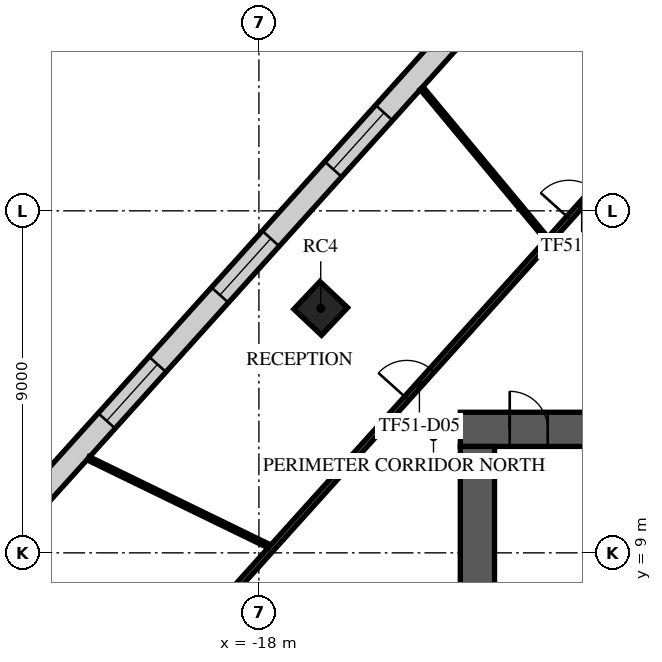
"""IFC4 building model, lengths in metres.
Left out: names, types, materials, properties, quantities, classifications, styles, units other than length and angle.
Written with IfcOpenShell. Run it as: python <this file> out.ifc"""

import sys

from ifc_helpers import new_model, si_unit, direction, frame, frame_2d, origin, origin_2d, place, context, subcontext, project, spatial, rectangle, extrude, element, fill, save


model = new_model("IFC4")
c1 = context("Model", 3, precision=1e-05, world=origin(), true_north=direction((0.0, 1.0)))
c2 = subcontext(c1, "Body", "Model", "MODEL_VIEW")
j1 = project(units=[si_unit("LENGTHUNIT", "METRE"), si_unit("PLANEANGLEUNIT", "RADIAN")], contexts=[c1])
p1 = place(None, origin())
s1 = spatial("IfcSite", under=j1, at=p1, CompositionType="ELEMENT")
p2 = place(p1, origin())
s2 = spatial("IfcBuilding", under=s1, at=p2, CompositionType="ELEMENT")
p3 = place(p2, frame((0.0, 0.0, 217.3)))
s3 = spatial("IfcBuildingStorey", under=s2, at=p3, CompositionType="ELEMENT", Elevation=217.3)
p4 = place(p3, frame((-16.373, 15.433, 0.0), z_axis=(0.0, 0.0, 1.0), x_axis=(0.685916152371, 0.727680583715, 0.0)))
e1 = element("IfcColumn", 1, at=p4, inside=s3, PredefinedType="COLUMN", context=c2, shape_type="SweptSolid", body=[
    extrude(rectangle(XDim=1.0, YDim=1.0, at=origin_2d()), origin(), (0.0, 0.0, 1.0), 4.0),
])
p5 = place(p3, frame((-12.7, 12.25, 0.0), z_axis=(0.0, 0.0, 1.0), x_axis=(1.0, 0.0, 0.0)))
e2 = element("IfcWall", 2, at=p5, inside=s3, PredefinedType="SHEAR", context=c2, shape_type="SweptSolid", body=[
    extrude(rectangle(XDim=25.4, YDim=0.9, at=frame_2d((12.7, 0.0))), origin(), (0.0, 0.0, 1.0), 3.62),
])
p6 = place(p5, frame((11.5, 0.0, 0.0)))
e3 = element("IfcOpeningElement", 3, at=p6, cuts=e2, PredefinedType="OPENING", context=c2, shape_type="SweptSolid", body=[
    extrude(rectangle(XDim=2.4, YDim=2.4, at=frame_2d((1.2, 1.2))), frame((0.0, 0.46, 0.0), z_axis=(0.0, -1.0, 0.0), x_axis=(1.0, 0.0, 0.0)), (0.0, 0.0, 1.0), 0.92),
])
p7 = place(p5, frame((22.325, 0.0, 0.0)))
e4 = element("IfcOpeningElement", 4, at=p7, cuts=e2, PredefinedType="OPENING", context=c2, shape_type="SweptSolid", body=[
    extrude(rectangle(XDim=1.2, YDim=2.1, at=frame_2d((0.6, 1.05))), frame((0.0, 0.46, 0.0), z_axis=(0.0, -1.0, 0.0), x_axis=(1.0, 0.0, 0.0)), (0.0, 0.0, 1.0), 0.92),
])
p8 = place(p5, frame((1.3, 0.0, 0.0)))
e5 = element("IfcOpeningElement", 5, at=p8, cuts=e2, PredefinedType="OPENING", context=c2, shape_type="SweptSolid", body=[
    extrude(rectangle(XDim=1.0, YDim=2.1, at=frame_2d((0.5, 1.05))), frame((0.0, 0.46, 0.0), z_axis=(0.0, -1.0, 0.0), x_axis=(1.0, 0.0, 0.0)), (0.0, 0.0, 1.0), 0.92),
])
p9 = place(p3, frame((-12.25, -11.8, 0.0), z_axis=(0.0, 0.0, 1.0), x_axis=(0.0, 1.0, 0.0)))
e6 = element("IfcWall", 6, at=p9, inside=s3, PredefinedType="SHEAR", context=c2, shape_type="SweptSolid", body=[
    extrude(rectangle(XDim=23.6, YDim=0.9, at=frame_2d((11.8, 0.0))), origin(), (0.0, 0.0, 1.0), 3.62),
])
p10 = place(p9, frame((10.6, 0.0, 0.0)))
e7 = element("IfcOpeningElement", 7, at=p10, cuts=e6, PredefinedType="OPENING", context=c2, shape_type="SweptSolid", body=[
    extrude(rectangle(XDim=2.4, YDim=2.4, at=frame_2d((1.2, 1.2))), frame((0.0, 0.46, 0.0), z_axis=(0.0, -1.0, 0.0), x_axis=(1.0, 0.0, 0.0)), (0.0, 0.0, 1.0), 0.92),
])
p11 = place(p3, frame((-1.962, 34.735, 0.0), z_axis=(0.0, 0.0, 1.0), x_axis=(-0.669133181838, -0.743142506497, 0.0)))
e8 = element("IfcWall", 8, at=p11, inside=s3, PredefinedType="STANDARD", context=c2, shape_type="SweptSolid", body=[
    extrude(rectangle(XDim=49.0, YDim=0.6, at=frame_2d((24.5, 0.0))), origin(), (0.0, 0.0, 1.0), 3.62),
])
p12 = place(p11, frame((1.227, 0.0, 0.9)))
e9 = element("IfcOpeningElement", 9, at=p12, cuts=e8, PredefinedType="OPENING", context=c2, shape_type="SweptSolid", body=[
    extrude(rectangle(XDim=2.0, YDim=2.1, at=frame_2d((1.0, 1.05))), frame((0.0, 0.31, 0.0), z_axis=(0.0, -1.0, 0.0), x_axis=(1.0, 0.0, 0.0)), (0.0, 0.0, 1.0), 0.62),
])
p13 = place(p11, frame((5.682, 0.0, 0.9)))
e10 = element("IfcOpeningElement", 10, at=p13, cuts=e8, PredefinedType="OPENING", context=c2, shape_type="SweptSolid", body=[
    extrude(rectangle(XDim=2.0, YDim=2.1, at=frame_2d((1.0, 1.05))), frame((0.0, 0.31, 0.0), z_axis=(0.0, -1.0, 0.0), x_axis=(1.0, 0.0, 0.0)), (0.0, 0.0, 1.0), 0.62),
])
p14 = place(p11, frame((10.136, 0.0, 0.9)))
e11 = element("IfcOpeningElement", 11, at=p14, cuts=e8, PredefinedType="OPENING", context=c2, shape_type="SweptSolid", body=[
    extrude(rectangle(XDim=2.0, YDim=2.1, at=frame_2d((1.0, 1.05))), frame((0.0, 0.31, 0.0), z_axis=(0.0, -1.0, 0.0), x_axis=(1.0, 0.0, 0.0)), (0.0, 0.0, 1.0), 0.62),
])
p15 = place(p11, frame((14.591, 0.0, 0.9)))
e12 = element("IfcOpeningElement", 12, at=p15, cuts=e8, PredefinedType="OPENING", context=c2, shape_type="SweptSolid", body=[
    extrude(rectangle(XDim=2.0, YDim=2.1, at=frame_2d((1.0, 1.05))), frame((0.0, 0.31, 0.0), z_axis=(0.0, -1.0, 0.0), x_axis=(1.0, 0.0, 0.0)), (0.0, 0.0, 1.0), 0.62),
])
p16 = place(p11, frame((19.045, 0.0, 0.9)))
e13 = element("IfcOpeningElement", 13, at=p16, cuts=e8, PredefinedType="OPENING", context=c2, shape_type="SweptSolid", body=[
    extrude(rectangle(XDim=2.0, YDim=2.1, at=frame_2d((1.0, 1.05))), frame((0.0, 0.31, 0.0), z_axis=(0.0, -1.0, 0.0), x_axis=(1.0, 0.0, 0.0)), (0.0, 0.0, 1.0), 0.62),
])
p17 = place(p11, frame((23.5, 0.0, 0.9)))
e14 = element("IfcOpeningElement", 14, at=p17, cuts=e8, PredefinedType="OPENING", context=c2, shape_type="SweptSolid", body=[
    extrude(rectangle(XDim=2.0, YDim=2.1, at=frame_2d((1.0, 1.05))), frame((0.0, 0.31, 0.0), z_axis=(0.0, -1.0, 0.0), x_axis=(1.0, 0.0, 0.0)), (0.0, 0.0, 1.0), 0.62),
])
p18 = place(p11, frame((27.955, 0.0, 0.9)))
e15 = element("IfcOpeningElement", 15, at=p18, cuts=e8, PredefinedType="OPENING", context=c2, shape_type="SweptSolid", body=[
    extrude(rectangle(XDim=2.0, YDim=2.1, at=frame_2d((1.0, 1.05))), frame((0.0, 0.31, 0.0), z_axis=(0.0, -1.0, 0.0), x_axis=(1.0, 0.0, 0.0)), (0.0, 0.0, 1.0), 0.62),
])
p19 = place(p11, frame((32.409, 0.0, 0.9)))
e16 = element("IfcOpeningElement", 16, at=p19, cuts=e8, PredefinedType="OPENING", context=c2, shape_type="SweptSolid", body=[
    extrude(rectangle(XDim=2.0, YDim=2.1, at=frame_2d((1.0, 1.05))), frame((0.0, 0.31, 0.0), z_axis=(0.0, -1.0, 0.0), x_axis=(1.0, 0.0, 0.0)), (0.0, 0.0, 1.0), 0.62),
])
p20 = place(p11, frame((36.864, 0.0, 0.9)))
e17 = element("IfcOpeningElement", 17, at=p20, cuts=e8, PredefinedType="OPENING", context=c2, shape_type="SweptSolid", body=[
    extrude(rectangle(XDim=2.0, YDim=2.1, at=frame_2d((1.0, 1.05))), frame((0.0, 0.31, 0.0), z_axis=(0.0, -1.0, 0.0), x_axis=(1.0, 0.0, 0.0)), (0.0, 0.0, 1.0), 0.62),
])
p21 = place(p11, frame((41.318, 0.0, 0.9)))
e18 = element("IfcOpeningElement", 18, at=p21, cuts=e8, PredefinedType="OPENING", context=c2, shape_type="SweptSolid", body=[
    extrude(rectangle(XDim=2.0, YDim=2.1, at=frame_2d((1.0, 1.05))), frame((0.0, 0.31, 0.0), z_axis=(0.0, -1.0, 0.0), x_axis=(1.0, 0.0, 0.0)), (0.0, 0.0, 1.0), 0.62),
])
p22 = place(p11, frame((45.773, 0.0, 0.9)))
e19 = element("IfcOpeningElement", 19, at=p22, cuts=e8, PredefinedType="OPENING", context=c2, shape_type="SweptSolid", body=[
    extrude(rectangle(XDim=2.0, YDim=2.1, at=frame_2d((1.0, 1.05))), frame((0.0, 0.31, 0.0), z_axis=(0.0, -1.0, 0.0), x_axis=(1.0, 0.0, 0.0)), (0.0, 0.0, 1.0), 0.62),
])
p23 = place(p3, frame((-24.952, 1.024, 0.0), z_axis=(0.0, 0.0, 1.0), x_axis=(0.66912723064, 0.743147864974, 0.0)))
e20 = element("IfcWall", 20, at=p23, inside=s3, PredefinedType="PARTITIONING", context=c2, shape_type="SweptSolid", body=[
    extrude(rectangle(XDim=31.871, YDim=0.15, at=frame_2d((15.936, 0.0))), origin(), (0.0, 0.0, 1.0), 3.17),
])
p24 = place(p23, frame((16.202, 0.0, 0.0)))
e21 = element("IfcOpeningElement", 21, at=p24, cuts=e20, PredefinedType="OPENING", context=c2, shape_type="SweptSolid", body=[
    extrude(rectangle(XDim=1.0, YDim=2.1, at=frame_2d((0.5, 1.05))), frame((0.0, 0.085, 0.0), z_axis=(0.0, -1.0, 0.0), x_axis=(1.0, 0.0, 0.0)), (0.0, 0.0, 1.0), 0.17),
])
p25 = place(p23, frame((28.08, 0.0, 0.0)))
e22 = element("IfcOpeningElement", 22, at=p25, cuts=e20, PredefinedType="OPENING", context=c2, shape_type="SweptSolid", body=[
    extrude(rectangle(XDim=1.8, YDim=2.1, at=frame_2d((0.9, 1.05))), frame((0.0, 0.085, 0.0), z_axis=(0.0, -1.0, 0.0), x_axis=(1.0, 0.0, 0.0)), (0.0, 0.0, 1.0), 0.17),
])
p26 = place(p23, frame((22.58, 0.0, 0.0)))
e23 = element("IfcOpeningElement", 23, at=p26, cuts=e20, PredefinedType="OPENING", context=c2, shape_type="SweptSolid", body=[
    extrude(rectangle(XDim=1.0, YDim=2.1, at=frame_2d((0.5, 1.05))), frame((0.0, 0.085, 0.0), z_axis=(0.0, -1.0, 0.0), x_axis=(1.0, 0.0, 0.0)), (0.0, 0.0, 1.0), 0.17),
])
p27 = place(p3, frame((-22.489, 11.486, 0.0), z_axis=(0.0, 0.0, 1.0), x_axis=(0.899358272064, -0.437212418019, 0.0)))
e24 = element("IfcWall", 24, at=p27, inside=s3, PredefinedType="PARTITIONING", context=c2, shape_type="SweptSolid", body=[
    extrude(rectangle(XDim=5.288, YDim=0.1, at=frame_2d((2.644, 0.0))), origin(), (0.0, 0.0, 1.0), 2.97),
])
p28 = place(p3, frame((-13.717, 21.228, 0.0), z_axis=(0.0, 0.0, 1.0), x_axis=(0.639202955897, -0.769038088246, 0.0)))
e25 = element("IfcWall", 25, at=p28, inside=s3, PredefinedType="PARTITIONING", context=c2, shape_type="SweptSolid", body=[
    extrude(rectangle(XDim=5.141, YDim=0.1, at=frame_2d((2.57, 0.0))), origin(), (0.0, 0.0, 1.0), 2.97),
])
p29 = place(p8, origin())
e26 = element("IfcDoor", 26, at=p29, inside=s3, OperationType="SINGLE_SWING_LEFT", PredefinedType="DOOR", context=c2, shape_type="SweptSolid", body=[
    extrude(rectangle(XDim=1.0, YDim=2.1, at=frame_2d((0.5, 1.05))), frame((0.0, 0.025, 0.0), z_axis=(0.0, -1.0, 0.0), x_axis=(1.0, 0.0, 0.0)), (0.0, 0.0, 1.0), 0.05),
])
fill(e5, e26)
p30 = place(p16, origin())
e27 = element("IfcWindow", 27, at=p30, inside=s3, PartitioningType="SINGLE_PANEL", PredefinedType="WINDOW", context=c2, shape_type="SweptSolid", body=[
    extrude(rectangle(XDim=2.0, YDim=2.1, at=frame_2d((1.0, 1.05))), frame((0.0, 0.03, 0.0), z_axis=(0.0, -1.0, 0.0), x_axis=(1.0, 0.0, 0.0)), (0.0, 0.0, 1.0), 0.06),
])
fill(e13, e27)
p31 = place(p17, origin())
e28 = element("IfcWindow", 28, at=p31, inside=s3, PartitioningType="SINGLE_PANEL", PredefinedType="WINDOW", context=c2, shape_type="SweptSolid", body=[
    extrude(rectangle(XDim=2.0, YDim=2.1, at=frame_2d((1.0, 1.05))), frame((0.0, 0.03, 0.0), z_axis=(0.0, -1.0, 0.0), x_axis=(1.0, 0.0, 0.0)), (0.0, 0.0, 1.0), 0.06),
])
fill(e14, e28)
p32 = place(p18, origin())
e29 = element("IfcWindow", 29, at=p32, inside=s3, PartitioningType="SINGLE_PANEL", PredefinedType="WINDOW", context=c2, shape_type="SweptSolid", body=[
    extrude(rectangle(XDim=2.0, YDim=2.1, at=frame_2d((1.0, 1.05))), frame((0.0, 0.03, 0.0), z_axis=(0.0, -1.0, 0.0), x_axis=(1.0, 0.0, 0.0)), (0.0, 0.0, 1.0), 0.06),
])
fill(e15, e29)
p33 = place(p24, origin())
e30 = element("IfcDoor", 30, at=p33, inside=s3, OperationType="SINGLE_SWING_RIGHT", PredefinedType="DOOR", context=c2, shape_type="SweptSolid", body=[
    extrude(rectangle(XDim=1.0, YDim=2.1, at=frame_2d((0.5, 1.05))), frame((0.0, 0.025, 0.0), z_axis=(0.0, -1.0, 0.0), x_axis=(1.0, 0.0, 0.0)), (0.0, 0.0, 1.0), 0.05),
])
fill(e21, e30)
p34 = place(p26, origin())
e31 = element("IfcDoor", 31, at=p34, inside=s3, OperationType="SINGLE_SWING_RIGHT", PredefinedType="DOOR", context=c2, shape_type="SweptSolid", body=[
    extrude(rectangle(XDim=1.0, YDim=2.1, at=frame_2d((0.5, 1.05))), frame((0.0, 0.025, 0.0), z_axis=(0.0, -1.0, 0.0), x_axis=(1.0, 0.0, 0.0)), (0.0, 0.0, 1.0), 0.05),
])
fill(e23, e31)
save(model, sys.argv[1])
